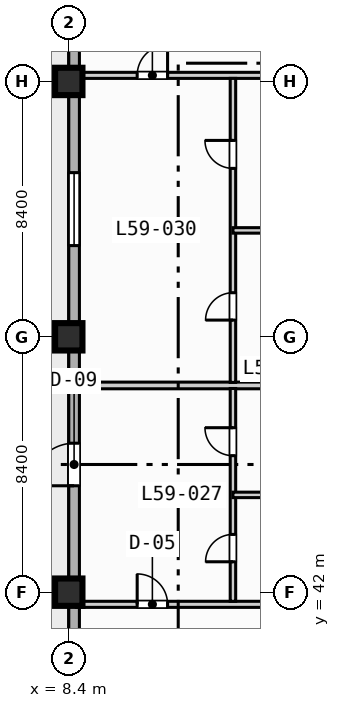
"""IFC4 building model, lengths in metres.
Left out: names, types, materials, properties, quantities, classifications, styles, units other than length and angle.
Written with IfcOpenShell. Run it as: python <this file> out.ifc"""

import sys

from ifc_helpers import new_model, si_unit, direction, frame, frame_2d, origin, origin_2d, place, context, subcontext, project, spatial, rectangle, extrude, element, fill, save


model = new_model("IFC4")
c1 = context("Model", 3, precision=1e-05, world=origin(), true_north=direction((0.0, 1.0)))
c2 = subcontext(c1, "Body", "Model", "MODEL_VIEW")
j1 = project(units=[si_unit("LENGTHUNIT", "METRE"), si_unit("PLANEANGLEUNIT", "RADIAN")], contexts=[c1])
p1 = place(None, origin())
s1 = spatial("IfcSite", under=j1, at=p1, CompositionType="ELEMENT")
p2 = place(p1, origin())
s2 = spatial("IfcBuilding", under=s1, at=p2, CompositionType="ELEMENT")
p3 = place(p2, frame((0.0, 0.0, 241.6)))
s3 = spatial("IfcBuildingStorey", under=s2, at=p3, CompositionType="ELEMENT", Elevation=241.6)
for number, where, z_axis, x_axis in (
    (1, (8.4, 42.0, 0.0), (0.0, 0.0, 1.0), (1.0, 0.0, 0.0)),
    (2, (8.4, 50.4, 0.0), (0.0, 0.0, 1.0), (1.0, 0.0, 0.0)),
    (3, (8.4, 58.8, 0.0), (0.0, 0.0, 1.0), (1.0, 0.0, 0.0)),
):
    element("IfcColumn", number, at=place(p3, frame(where, z_axis=z_axis, x_axis=x_axis)), inside=s3, PredefinedType="COLUMN", context=c2, shape_type="SweptSolid", body=[
        extrude(rectangle(XDim=0.9, YDim=0.9, at=origin_2d()), origin(), (0.0, 0.0, 1.0), 3.7),
    ])
p4 = place(p3, frame((8.575, 11.575, 0.0), z_axis=(0.0, 0.0, 1.0), x_axis=(0.0, 1.0, 0.0)))
e4 = element("IfcWall", 4, at=p4, inside=s3, PredefinedType="STANDARD", context=c2, shape_type="SweptSolid", body=[
    extrude(rectangle(XDim=60.85, YDim=0.35, at=frame_2d((30.425, 0.0))), origin(), (0.0, 0.0, 1.0), 3.47),
])
p5 = place(p4, frame((33.925, 0.0, 0.0)))
e5 = element("IfcOpeningElement", 5, at=p5, cuts=e4, PredefinedType="OPENING", context=c2, shape_type="SweptSolid", body=[
    extrude(rectangle(XDim=1.4, YDim=2.2, at=frame_2d((0.7, 1.1))), frame((0.0, 0.185, 0.0), z_axis=(0.0, -1.0, 0.0), x_axis=(1.0, 0.0, 0.0)), (0.0, 0.0, 1.0), 0.37),
])
p6 = place(p4, frame((25.025, 0.0, 0.85)))
e6 = element("IfcOpeningElement", 6, at=p6, cuts=e4, PredefinedType="OPENING", context=c2, shape_type="SweptSolid", body=[
    extrude(rectangle(XDim=2.4, YDim=1.95, at=frame_2d((1.2, 0.975))), frame((0.0, 0.185, 0.0), z_axis=(0.0, -1.0, 0.0), x_axis=(1.0, 0.0, 0.0)), (0.0, 0.0, 1.0), 0.37),
])
p7 = place(p4, frame((41.825, 0.0, 0.85)))
e7 = element("IfcOpeningElement", 7, at=p7, cuts=e4, PredefinedType="OPENING", context=c2, shape_type="SweptSolid", body=[
    extrude(rectangle(XDim=2.4, YDim=1.95, at=frame_2d((1.2, 0.975))), frame((0.0, 0.185, 0.0), z_axis=(0.0, -1.0, 0.0), x_axis=(1.0, 0.0, 0.0)), (0.0, 0.0, 1.0), 0.37),
])
p8 = place(p3, frame((8.65, 41.6, 0.0), z_axis=(0.0, 0.0, 1.0), x_axis=(1.0, 0.0, 0.0)))
e8 = element("IfcWall", 8, at=p8, inside=s3, PredefinedType="PARTITIONING", context=c2, shape_type="SweptSolid", body=[
    extrude(rectangle(XDim=7.95, YDim=0.2, at=frame_2d((3.975, 0.0))), origin(), (0.0, 0.0, 1.0), 3.47),
])
p9 = place(p8, frame((2.0, 0.0, 0.0)))
e9 = element("IfcOpeningElement", 9, at=p9, cuts=e8, PredefinedType="OPENING", context=c2, shape_type="SweptSolid", body=[
    extrude(rectangle(XDim=1.0, YDim=2.15, at=frame_2d((0.5, 1.075))), frame((0.0, 0.11, 0.0), z_axis=(0.0, -1.0, 0.0), x_axis=(1.0, 0.0, 0.0)), (0.0, 0.0, 1.0), 0.22),
])
p10 = place(p3, frame((8.65, 59.0, 0.0), z_axis=(0.0, 0.0, 1.0), x_axis=(1.0, 0.0, 0.0)))
e10 = element("IfcWall", 10, at=p10, inside=s3, PredefinedType="PARTITIONING", context=c2, shape_type="SweptSolid", body=[
    extrude(rectangle(XDim=7.95, YDim=0.2, at=frame_2d((3.975, 0.0))), origin(), (0.0, 0.0, 1.0), 2.853),
])
p11 = place(p10, frame((2.0, 0.0, 0.0)))
e11 = element("IfcOpeningElement", 11, at=p11, cuts=e10, PredefinedType="OPENING", context=c2, shape_type="SweptSolid", body=[
    extrude(rectangle(XDim=1.0, YDim=2.15, at=frame_2d((0.5, 1.075))), frame((0.0, 0.11, 0.0), z_axis=(0.0, -1.0, 0.0), x_axis=(1.0, 0.0, 0.0)), (0.0, 0.0, 1.0), 0.22),
])
p12 = place(p3, frame((8.65, 48.8, 0.0), z_axis=(0.0, 0.0, 1.0), x_axis=(1.0, 0.0, 0.0)))
e12 = element("IfcWall", 12, at=p12, inside=s3, PredefinedType="PARTITIONING", context=c2, shape_type="SweptSolid", body=[
    extrude(rectangle(XDim=7.95, YDim=0.22, at=frame_2d((3.975, 0.0))), origin(), (0.0, 0.0, 1.0), 3.47),
])
p13 = place(p3, frame((13.8, 41.7, 0.0), z_axis=(0.0, 0.0, 1.0), x_axis=(0.0, 1.0, 0.0)))
e13 = element("IfcWall", 13, at=p13, inside=s3, PredefinedType="PLUMBINGWALL", context=c2, shape_type="SweptSolid", body=[
    extrude(rectangle(XDim=7.0, YDim=0.18, at=frame_2d((3.5, 0.0))), origin(), (0.0, 0.0, 1.0), 3.47),
])
p14 = place(p13, frame((1.3, 0.0, 0.0)))
e14 = element("IfcOpeningElement", 14, at=p14, cuts=e13, PredefinedType="OPENING", context=c2, shape_type="SweptSolid", body=[
    extrude(rectangle(XDim=0.9, YDim=2.1, at=frame_2d((0.45, 1.05))), frame((0.0, 0.1, 0.0), z_axis=(0.0, -1.0, 0.0), x_axis=(1.0, 0.0, 0.0)), (0.0, 0.0, 1.0), 0.2),
])
p15 = place(p13, frame((4.79, 0.0, 0.0)))
e15 = element("IfcOpeningElement", 15, at=p15, cuts=e13, PredefinedType="OPENING", context=c2, shape_type="SweptSolid", body=[
    extrude(rectangle(XDim=0.92, YDim=2.1, at=frame_2d((0.46, 1.05))), frame((0.0, 0.1, 0.0), z_axis=(0.0, -1.0, 0.0), x_axis=(1.0, 0.0, 0.0)), (0.0, 0.0, 1.0), 0.2),
])
p16 = place(p3, frame((13.8, 45.2, 0.0), z_axis=(0.0, 0.0, 1.0), x_axis=(1.0, 0.0, 0.0)))
e16 = element("IfcWall", 16, at=p16, inside=s3, PredefinedType="PLUMBINGWALL", context=c2, shape_type="SweptSolid", body=[
    extrude(rectangle(XDim=2.8, YDim=0.18, at=frame_2d((1.4, 0.0))), origin(), (0.0, 0.0, 1.0), 3.47),
])
p17 = place(p3, frame((13.8, 48.9, 0.0), z_axis=(0.0, 0.0, 1.0), x_axis=(0.0, 1.0, 0.0)))
e17 = element("IfcWall", 17, at=p17, inside=s3, PredefinedType="PLUMBINGWALL", context=c2, shape_type="SweptSolid", body=[
    extrude(rectangle(XDim=10.0, YDim=0.18, at=frame_2d((5.0, 0.0))), origin(), (0.0, 0.0, 1.0), 3.47),
])
p18 = place(p17, frame((2.05, 0.0, 0.0)))
e18 = element("IfcOpeningElement", 18, at=p18, cuts=e17, PredefinedType="OPENING", context=c2, shape_type="SweptSolid", body=[
    extrude(rectangle(XDim=0.9, YDim=2.1, at=frame_2d((0.45, 1.05))), frame((0.0, 0.1, 0.0), z_axis=(0.0, -1.0, 0.0), x_axis=(1.0, 0.0, 0.0)), (0.0, 0.0, 1.0), 0.2),
])
p19 = place(p17, frame((7.04, 0.0, 0.0)))
e19 = element("IfcOpeningElement", 19, at=p19, cuts=e17, PredefinedType="OPENING", context=c2, shape_type="SweptSolid", body=[
    extrude(rectangle(XDim=0.92, YDim=2.1, at=frame_2d((0.46, 1.05))), frame((0.0, 0.1, 0.0), z_axis=(0.0, -1.0, 0.0), x_axis=(1.0, 0.0, 0.0)), (0.0, 0.0, 1.0), 0.2),
])
p20 = place(p3, frame((13.8, 53.9, 0.0), z_axis=(0.0, 0.0, 1.0), x_axis=(1.0, 0.0, 0.0)))
e20 = element("IfcWall", 20, at=p20, inside=s3, PredefinedType="PLUMBINGWALL", context=c2, shape_type="SweptSolid", body=[
    extrude(rectangle(XDim=2.8, YDim=0.18, at=frame_2d((1.4, 0.0))), origin(), (0.0, 0.0, 1.0), 3.47),
])
p21 = place(p5, origin())
e21 = element("IfcDoor", 21, at=p21, inside=s3, OperationType="SINGLE_SWING_LEFT", PredefinedType="DOOR", context=c2, shape_type="SweptSolid", body=[
    extrude(rectangle(XDim=1.4, YDim=2.2, at=frame_2d((0.7, 1.1))), frame((0.0, 0.025, 0.0), z_axis=(0.0, -1.0, 0.0), x_axis=(1.0, 0.0, 0.0)), (0.0, 0.0, 1.0), 0.05),
])
fill(e5, e21)
p22 = place(p7, origin())
e22 = element("IfcWindow", 22, at=p22, inside=s3, PartitioningType="SINGLE_PANEL", PredefinedType="WINDOW", context=c2, shape_type="SweptSolid", body=[
    extrude(rectangle(XDim=2.4, YDim=1.95, at=frame_2d((1.2, 0.975))), frame((0.0, 0.03, 0.0), z_axis=(0.0, -1.0, 0.0), x_axis=(1.0, 0.0, 0.0)), (0.0, 0.0, 1.0), 0.06),
])
fill(e7, e22)
p23 = place(p9, origin())
e23 = element("IfcDoor", 23, at=p23, inside=s3, OperationType="SINGLE_SWING_LEFT", PredefinedType="DOOR", context=c2, shape_type="SweptSolid", body=[
    extrude(rectangle(XDim=1.0, YDim=2.15, at=frame_2d((0.5, 1.075))), frame((0.0, 0.025, 0.0), z_axis=(0.0, -1.0, 0.0), x_axis=(1.0, 0.0, 0.0)), (0.0, 0.0, 1.0), 0.05),
])
fill(e9, e23)
p24 = place(p11, origin())
e24 = element("IfcDoor", 24, at=p24, inside=s3, OperationType="SINGLE_SWING_RIGHT", PredefinedType="DOOR", context=c2, shape_type="SweptSolid", body=[
    extrude(rectangle(XDim=1.0, YDim=2.15, at=frame_2d((0.5, 1.075))), frame((0.0, 0.025, 0.0), z_axis=(0.0, -1.0, 0.0), x_axis=(1.0, 0.0, 0.0)), (0.0, 0.0, 1.0), 0.05),
])
fill(e11, e24)
p25 = place(p14, origin())
e25 = element("IfcDoor", 25, at=p25, inside=s3, OperationType="SINGLE_SWING_LEFT", PredefinedType="DOOR", context=c2, shape_type="SweptSolid", body=[
    extrude(rectangle(XDim=0.9, YDim=2.1, at=frame_2d((0.45, 1.05))), frame((0.0, 0.025, 0.0), z_axis=(0.0, -1.0, 0.0), x_axis=(1.0, 0.0, 0.0)), (0.0, 0.0, 1.0), 0.05),
])
fill(e14, e25)
p26 = place(p15, origin())
e26 = element("IfcDoor", 26, at=p26, inside=s3, OperationType="SINGLE_SWING_RIGHT", PredefinedType="DOOR", context=c2, shape_type="SweptSolid", body=[
    extrude(rectangle(XDim=0.92, YDim=2.1, at=frame_2d((0.46, 1.05))), frame((0.0, 0.025, 0.0), z_axis=(0.0, -1.0, 0.0), x_axis=(1.0, 0.0, 0.0)), (0.0, 0.0, 1.0), 0.05),
])
fill(e15, e26)
p27 = place(p18, origin())
e27 = element("IfcDoor", 27, at=p27, inside=s3, OperationType="SINGLE_SWING_LEFT", PredefinedType="DOOR", context=c2, shape_type="SweptSolid", body=[
    extrude(rectangle(XDim=0.9, YDim=2.1, at=frame_2d((0.45, 1.05))), frame((0.0, 0.025, 0.0), z_axis=(0.0, -1.0, 0.0), x_axis=(1.0, 0.0, 0.0)), (0.0, 0.0, 1.0), 0.05),
])
fill(e18, e27)
p28 = place(p19, origin())
e28 = element("IfcDoor", 28, at=p28, inside=s3, OperationType="SINGLE_SWING_RIGHT", PredefinedType="DOOR", context=c2, shape_type="SweptSolid", body=[
    extrude(rectangle(XDim=0.92, YDim=2.1, at=frame_2d((0.46, 1.05))), frame((0.0, 0.025, 0.0), z_axis=(0.0, -1.0, 0.0), x_axis=(1.0, 0.0, 0.0)), (0.0, 0.0, 1.0), 0.05),
])
fill(e19, e28)
save(model, sys.argv[1])
